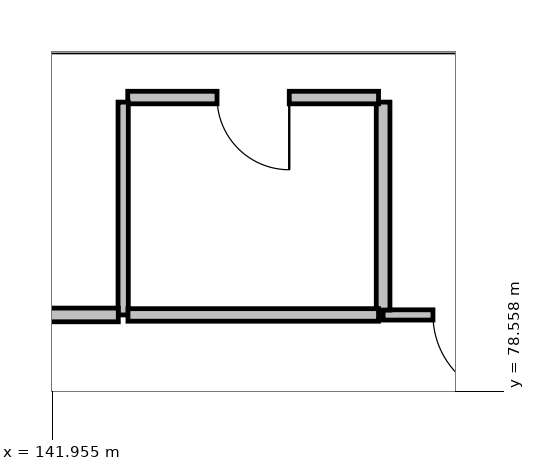
"""IFC4 building model, lengths in metres.
Left out: names, types, materials, properties, quantities, classifications, styles, units other than length and angle.
Written with IfcOpenShell. Run it as: python <this file> out.ifc"""

import sys

from ifc_helpers import new_model, si_unit, direction, frame, frame_2d, origin, place, context, subcontext, project, spatial, rectangle, extrude, element, fill, save


model = new_model("IFC4")
c1 = context("Model", 3, precision=1e-05, world=origin(), true_north=direction((0.0, 1.0)))
c2 = subcontext(c1, "Body", "Model", "MODEL_VIEW")
j1 = project(units=[si_unit("LENGTHUNIT", "METRE"), si_unit("PLANEANGLEUNIT", "RADIAN")], contexts=[c1])
p1 = place(None, origin())
s1 = spatial("IfcSite", under=j1, at=p1, CompositionType="ELEMENT")
p2 = place(p1, origin())
s2 = spatial("IfcBuilding", under=s1, at=p2, CompositionType="ELEMENT")
p3 = place(p2, frame((0.0, 0.0, 19.2)))
s3 = spatial("IfcBuildingStorey", under=s2, at=p3, CompositionType="ELEMENT", Elevation=19.2)
p4 = place(p3, frame((148.722, 79.56, 0.0), z_axis=(0.0, 0.0, 1.0), x_axis=(-1.0, 0.0, 0.0)))
e1 = element("IfcWall", 1, at=p4, inside=s3, PredefinedType="PARTITIONING", context=c2, shape_type="SweptSolid", body=[
    extrude(rectangle(XDim=2.412, YDim=0.135, at=frame_2d((1.206, 0.0))), origin(), (0.0, 0.0, 1.0), 3.77),
])
p5 = place(p4, frame((0.656, 0.0, 0.0)))
e2 = element("IfcOpeningElement", 2, at=p5, cuts=e1, PredefinedType="OPENING", context=c2, shape_type="SweptSolid", body=[
    extrude(rectangle(XDim=1.1, YDim=2.15, at=frame_2d((0.55, 1.075))), frame((0.0, 0.077, 0.0), z_axis=(0.0, -1.0, 0.0), x_axis=(1.0, 0.0, 0.0)), (0.0, 0.0, 1.0), 0.155),
])
p6 = place(p3, frame((146.31, 79.624, 0.0), z_axis=(0.0, 0.0, 1.0), x_axis=(0.0, 1.0, 0.0)))
e3 = element("IfcWall", 3, at=p6, inside=s3, PredefinedType="PARTITIONING", context=c2, shape_type="SweptSolid", body=[
    extrude(rectangle(XDim=2.736, YDim=0.18, at=frame_2d((1.368, 0.0))), origin(), (0.0, 0.0, 1.0), 3.77),
])
p7 = place(p3, frame((146.25, 82.42, 0.0), z_axis=(0.0, 0.0, 1.0), x_axis=(-1.0, 0.0, 0.0)))
e4 = element("IfcWall", 4, at=p7, inside=s3, PredefinedType="PARTITIONING", context=c2, shape_type="SweptSolid", body=[
    extrude(rectangle(XDim=3.3, YDim=0.165, at=frame_2d((1.65, 0.0))), origin(), (0.0, 0.0, 1.0), 3.77),
])
p8 = place(p7, frame((1.175, 0.0, 0.0)))
e5 = element("IfcOpeningElement", 5, at=p8, cuts=e4, PredefinedType="OPENING", context=c2, shape_type="SweptSolid", body=[
    extrude(rectangle(XDim=0.95, YDim=2.1, at=frame_2d((0.475, 1.05))), frame((0.0, 0.093, 0.0), z_axis=(0.0, -1.0, 0.0), x_axis=(1.0, 0.0, 0.0)), (0.0, 0.0, 1.0), 0.185),
])
p9 = place(p3, frame((142.89, 82.36, 0.0), z_axis=(0.0, 0.0, 1.0), x_axis=(0.0, -1.0, 0.0)))
e6 = element("IfcWall", 6, at=p9, inside=s3, PredefinedType="PARTITIONING", context=c2, shape_type="SweptSolid", body=[
    extrude(rectangle(XDim=2.8, YDim=0.135, at=frame_2d((1.4, 0.0))), origin(), (0.0, 0.0, 1.0), 3.77),
])
p10 = place(p3, frame((142.826, 79.56, 0.0), z_axis=(0.0, 0.0, 1.0), x_axis=(-1.0, 0.0, 0.0)))
e7 = element("IfcWall", 7, at=p10, inside=s3, PredefinedType="PARTITIONING", context=c2, shape_type="SweptSolid", body=[
    extrude(rectangle(XDim=2.34, YDim=0.18, at=frame_2d((1.17, 0.0))), origin(), (0.0, 0.0, 1.0), 3.77),
])
p11 = place(p3, frame((146.25, 79.56, 0.0), z_axis=(0.0, 0.0, 1.0), x_axis=(-1.0, 0.0, 0.0)))
e8 = element("IfcWall", 8, at=p11, inside=s3, PredefinedType="PARTITIONING", context=c2, shape_type="SweptSolid", body=[
    extrude(rectangle(XDim=3.297, YDim=0.165, at=frame_2d((1.648, 0.0))), origin(), (0.0, 0.0, 1.0), 3.77),
])
p12 = place(p5, origin())
e9 = element("IfcDoor", 9, at=p12, inside=s3, OperationType="SINGLE_SWING_RIGHT", PredefinedType="DOOR", context=c2, shape_type="SweptSolid", body=[
    extrude(rectangle(XDim=1.1, YDim=2.15, at=frame_2d((0.55, 1.075))), frame((0.0, 0.025, 0.0), z_axis=(0.0, -1.0, 0.0), x_axis=(1.0, 0.0, 0.0)), (0.0, 0.0, 1.0), 0.05),
])
fill(e2, e9)
p13 = place(p8, origin())
e10 = element("IfcDoor", 10, at=p13, inside=s3, OperationType="SINGLE_SWING_LEFT", PredefinedType="DOOR", context=c2, shape_type="SweptSolid", body=[
    extrude(rectangle(XDim=0.95, YDim=2.1, at=frame_2d((0.475, 1.05))), frame((0.0, 0.025, 0.0), z_axis=(0.0, -1.0, 0.0), x_axis=(1.0, 0.0, 0.0)), (0.0, 0.0, 1.0), 0.05),
])
fill(e5, e10)
save(model, sys.argv[1])
